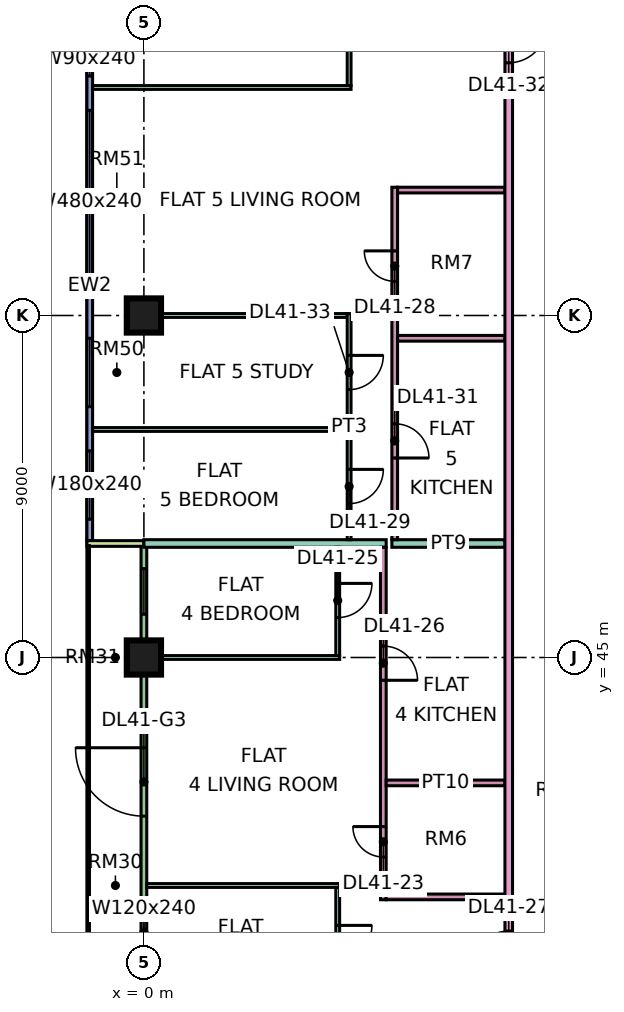
"""IFC4 building model, lengths in metres.
Left out: names, types, materials, properties, quantities, classifications, styles, units other than length and angle.
Written with IfcOpenShell. Run it as: python <this file> out.ifc"""

import sys

from ifc_helpers import new_model, si_unit, direction, frame, frame_2d, origin, origin_2d, place, context, subcontext, project, spatial, rectangle, extrude, element, fill, save


model = new_model("IFC4")
c1 = context("Model", 3, precision=1e-05, world=origin(), true_north=direction((0.0, 1.0)))
c2 = subcontext(c1, "Body", "Model", "MODEL_VIEW")
j1 = project(units=[si_unit("LENGTHUNIT", "METRE"), si_unit("PLANEANGLEUNIT", "RADIAN")], contexts=[c1])
p1 = place(None, origin())
s1 = spatial("IfcSite", under=j1, at=p1, CompositionType="ELEMENT")
p2 = place(p1, origin())
s2 = spatial("IfcBuilding", under=s1, at=p2, CompositionType="ELEMENT")
p3 = place(p2, frame((0.0, 0.0, 179.9)))
s3 = spatial("IfcBuildingStorey", under=s2, at=p3, CompositionType="ELEMENT", Elevation=179.9)
p4 = place(p3, frame((0.0, 45.0, 0.0), z_axis=(0.0, 0.0, 1.0), x_axis=(1.0, 0.0, 0.0)))
e1 = element("IfcColumn", 1, at=p4, inside=s3, PredefinedType="COLUMN", context=c2, shape_type="SweptSolid", body=[
    extrude(rectangle(XDim=0.9, YDim=0.9, at=origin_2d()), origin(), (0.0, 0.0, 1.0), 3.75),
])
p5 = place(p3, frame((0.0, 54.0, 0.0), z_axis=(0.0, 0.0, 1.0), x_axis=(1.0, 0.0, 0.0)))
e2 = element("IfcColumn", 2, at=p5, inside=s3, PredefinedType="COLUMN", context=c2, shape_type="SweptSolid", body=[
    extrude(rectangle(XDim=0.9, YDim=0.9, at=origin_2d()), origin(), (0.0, 0.0, 1.0), 3.75),
])
p6 = place(p3, frame((-1.425, 61.5, 0.0), z_axis=(0.0, 0.0, 1.0), x_axis=(0.0, -1.0, 0.0)))
e3 = element("IfcWall", 3, at=p6, inside=s3, PredefinedType="SOLIDWALL", context=c2, shape_type="SweptSolid", body=[
    extrude(rectangle(XDim=13.425, YDim=0.15, at=frame_2d((6.712, 0.0))), origin(), (0.0, 0.0, 1.0), 3.35),
])
p7 = place(p6, frame((0.3, 0.0, 0.45)))
e4 = element("IfcOpeningElement", 4, at=p7, cuts=e3, PredefinedType="OPENING", context=c2, shape_type="SweptSolid", body=[
    extrude(rectangle(XDim=0.9, YDim=2.4, at=frame_2d((0.45, 1.2))), frame((0.0, 0.085, 0.0), z_axis=(0.0, -1.0, 0.0), x_axis=(1.0, 0.0, 0.0)), (0.0, 0.0, 1.0), 0.17),
])
p8 = place(p6, frame((2.1, 0.0, 0.45)))
e5 = element("IfcOpeningElement", 5, at=p8, cuts=e3, PredefinedType="OPENING", context=c2, shape_type="SweptSolid", body=[
    extrude(rectangle(XDim=4.8, YDim=2.4, at=frame_2d((2.4, 1.2))), frame((0.0, 0.085, 0.0), z_axis=(0.0, -1.0, 0.0), x_axis=(1.0, 0.0, 0.0)), (0.0, 0.0, 1.0), 0.17),
])
p9 = place(p6, frame((8.1, 0.0, 0.45)))
e6 = element("IfcOpeningElement", 6, at=p9, cuts=e3, PredefinedType="OPENING", context=c2, shape_type="SweptSolid", body=[
    extrude(rectangle(XDim=1.8, YDim=2.4, at=frame_2d((0.9, 1.2))), frame((0.0, 0.085, 0.0), z_axis=(0.0, -1.0, 0.0), x_axis=(1.0, 0.0, 0.0)), (0.0, 0.0, 1.0), 0.17),
])
p10 = place(p6, frame((11.062, 0.0, 0.45)))
e7 = element("IfcOpeningElement", 7, at=p10, cuts=e3, PredefinedType="OPENING", context=c2, shape_type="SweptSolid", body=[
    extrude(rectangle(XDim=1.8, YDim=2.4, at=frame_2d((0.9, 1.2))), frame((0.0, 0.085, 0.0), z_axis=(0.0, -1.0, 0.0), x_axis=(1.0, 0.0, 0.0)), (0.0, 0.0, 1.0), 0.17),
])
p11 = place(p3, frame((0.0, 47.925, 0.0), z_axis=(0.0, 0.0, 1.0), x_axis=(0.0, -1.0, 0.0)))
e8 = element("IfcWall", 8, at=p11, inside=s3, PredefinedType="SOLIDWALL", context=c2, shape_type="SweptSolid", body=[
    extrude(rectangle(XDim=11.85, YDim=0.15, at=frame_2d((5.925, 0.0))), origin(), (0.0, 0.0, 1.0), 3.35),
])
p12 = place(p11, frame((0.587, 0.0, 0.45)))
e9 = element("IfcOpeningElement", 9, at=p12, cuts=e8, PredefinedType="OPENING", context=c2, shape_type="SweptSolid", body=[
    extrude(rectangle(XDim=1.2, YDim=2.4, at=frame_2d((0.6, 1.2))), frame((0.0, 0.085, 0.0), z_axis=(0.0, -1.0, 0.0), x_axis=(1.0, 0.0, 0.0)), (0.0, 0.0, 1.0), 0.17),
])
p13 = place(p11, frame((5.3, 0.0, 0.0)))
e10 = element("IfcOpeningElement", 10, at=p13, cuts=e8, PredefinedType="OPENING", context=c2, shape_type="SweptSolid", body=[
    extrude(rectangle(XDim=1.8, YDim=2.4, at=frame_2d((0.9, 1.2))), frame((0.0, 0.085, 0.0), z_axis=(0.0, -1.0, 0.0), x_axis=(1.0, 0.0, 0.0)), (0.0, 0.0, 1.0), 0.17),
])
p14 = place(p11, frame((9.55, 0.0, 0.45)))
e11 = element("IfcOpeningElement", 11, at=p14, cuts=e8, PredefinedType="OPENING", context=c2, shape_type="SweptSolid", body=[
    extrude(rectangle(XDim=1.2, YDim=2.4, at=frame_2d((0.6, 1.2))), frame((0.0, 0.085, 0.0), z_axis=(0.0, -1.0, 0.0), x_axis=(1.0, 0.0, 0.0)), (0.0, 0.0, 1.0), 0.17),
])
p15 = place(p3, frame((-1.5, 48.0, 0.0), z_axis=(0.0, 0.0, 1.0), x_axis=(1.0, 0.0, 0.0)))
e12 = element("IfcWall", 12, at=p15, inside=s3, PredefinedType="SOLIDWALL", context=c2, shape_type="SweptSolid", body=[
    extrude(rectangle(XDim=1.5, YDim=0.15, at=frame_2d((0.75, 0.0))), origin(), (0.0, 0.0, 1.0), 3.35),
])
p16 = place(p3, frame((0.0, 48.0, 0.0), z_axis=(0.0, 0.0, 1.0), x_axis=(1.0, 0.0, 0.0)))
e13 = element("IfcWall", 13, at=p16, inside=s3, PredefinedType="PARTITIONING", context=c2, shape_type="SweptSolid", body=[
    extrude(rectangle(XDim=6.375, YDim=0.2, at=frame_2d((3.188, 0.0))), origin(), (0.0, 0.0, 1.0), 3.35),
])
p17 = place(p3, frame((-1.35, 51.0, 0.0), z_axis=(0.0, 0.0, 1.0), x_axis=(1.0, 0.0, 0.0)))
e14 = element("IfcWall", 14, at=p17, inside=s3, PredefinedType="PARTITIONING", context=c2, shape_type="SweptSolid", body=[
    extrude(rectangle(XDim=6.7, YDim=0.1, at=frame_2d((3.35, 0.0))), origin(), (0.0, 0.0, 1.0), 3.35),
])
e15 = element("IfcWall", 15, at=p5, inside=s3, PredefinedType="PARTITIONING", context=c2, shape_type="SweptSolid", body=[
    extrude(rectangle(XDim=5.35, YDim=0.1, at=frame_2d((2.675, 0.0))), origin(), (0.0, 0.0, 1.0), 3.35),
])
p18 = place(p3, frame((-1.35, 60.0, 0.0), z_axis=(0.0, 0.0, 1.0), x_axis=(1.0, 0.0, 0.0)))
e16 = element("IfcWall", 16, at=p18, inside=s3, PredefinedType="PARTITIONING", context=c2, shape_type="SweptSolid", body=[
    extrude(rectangle(XDim=6.8, YDim=0.1, at=frame_2d((3.4, 0.0))), origin(), (0.0, 0.0, 1.0), 3.35),
])
for number, where, z_axis, x_axis in (
    (17, (0.074, 39.0, 0.0), (0.0, 0.0, 1.0), (1.0, 0.0, 0.0)),
    (18, (0.074, 45.0, 0.0), (0.0, 0.0, 1.0), (1.0, 0.0, 0.0)),
):
    element("IfcWall", number, at=place(p3, frame(where, z_axis=z_axis, x_axis=x_axis)), inside=s3, PredefinedType="PARTITIONING", context=c2, shape_type="SweptSolid", body=[
        extrude(rectangle(XDim=5.076, YDim=0.1, at=frame_2d((2.538, 0.0))), origin(), (0.0, 0.0, 1.0), 3.35),
    ])
p19 = place(p3, frame((5.1, 36.1, 0.0), z_axis=(0.0, 0.0, 1.0), x_axis=(0.0, 1.0, 0.0)))
e19 = element("IfcWall", 19, at=p19, inside=s3, PredefinedType="PARTITIONING", context=c2, shape_type="SweptSolid", body=[
    extrude(rectangle(XDim=2.85, YDim=0.1, at=frame_2d((1.425, 0.0))), origin(), (0.0, 0.0, 1.0), 3.35),
])
p20 = place(p19, frame((0.95, 0.0, 0.0)))
e20 = element("IfcOpeningElement", 20, at=p20, cuts=e19, PredefinedType="OPENING", context=c2, shape_type="SweptSolid", body=[
    extrude(rectangle(XDim=0.9, YDim=2.1, at=frame_2d((0.45, 1.05))), frame((0.0, 0.06, 0.0), z_axis=(0.0, -1.0, 0.0), x_axis=(1.0, 0.0, 0.0)), (0.0, 0.0, 1.0), 0.12),
])
p21 = place(p3, frame((5.1, 45.05, 0.0), z_axis=(0.0, 0.0, 1.0), x_axis=(0.0, 1.0, 0.0)))
e21 = element("IfcWall", 21, at=p21, inside=s3, PredefinedType="PARTITIONING", context=c2, shape_type="SweptSolid", body=[
    extrude(rectangle(XDim=2.85, YDim=0.1, at=frame_2d((1.425, 0.0))), origin(), (0.0, 0.0, 1.0), 3.35),
])
p22 = place(p21, frame((1.0, 0.0, 0.0)))
e22 = element("IfcOpeningElement", 22, at=p22, cuts=e21, PredefinedType="OPENING", context=c2, shape_type="SweptSolid", body=[
    extrude(rectangle(XDim=0.9, YDim=2.1, at=frame_2d((0.45, 1.05))), frame((0.0, 0.06, 0.0), z_axis=(0.0, -1.0, 0.0), x_axis=(1.0, 0.0, 0.0)), (0.0, 0.0, 1.0), 0.12),
])
p23 = place(p3, frame((5.4, 48.1, 0.0), z_axis=(0.0, 0.0, 1.0), x_axis=(0.0, 1.0, 0.0)))
e23 = element("IfcWall", 23, at=p23, inside=s3, PredefinedType="PARTITIONING", context=c2, shape_type="SweptSolid", body=[
    extrude(rectangle(XDim=5.95, YDim=0.1, at=frame_2d((2.975, 0.0))), origin(), (0.0, 0.0, 1.0), 3.35),
])
p24 = place(p23, frame((0.95, 0.0, 0.0)))
e24 = element("IfcOpeningElement", 24, at=p24, cuts=e23, PredefinedType="OPENING", context=c2, shape_type="SweptSolid", body=[
    extrude(rectangle(XDim=0.9, YDim=2.1, at=frame_2d((0.45, 1.05))), frame((0.0, 0.06, 0.0), z_axis=(0.0, -1.0, 0.0), x_axis=(1.0, 0.0, 0.0)), (0.0, 0.0, 1.0), 0.12),
])
p25 = place(p23, frame((3.95, 0.0, 0.0)))
e25 = element("IfcOpeningElement", 25, at=p25, cuts=e23, PredefinedType="OPENING", context=c2, shape_type="SweptSolid", body=[
    extrude(rectangle(XDim=0.9, YDim=2.1, at=frame_2d((0.45, 1.05))), frame((0.0, 0.06, 0.0), z_axis=(0.0, -1.0, 0.0), x_axis=(1.0, 0.0, 0.0)), (0.0, 0.0, 1.0), 0.12),
])
p26 = place(p3, frame((5.4, 60.05, 0.0), z_axis=(0.0, 0.0, 1.0), x_axis=(0.0, 1.0, 0.0)))
e26 = element("IfcWall", 26, at=p26, inside=s3, PredefinedType="PARTITIONING", context=c2, shape_type="SweptSolid", body=[
    extrude(rectangle(XDim=3.0, YDim=0.1, at=frame_2d((1.5, 0.0))), origin(), (0.0, 0.0, 1.0), 3.35),
])
p27 = place(p26, frame((1.0, 0.0, 0.0)))
e27 = element("IfcOpeningElement", 27, at=p27, cuts=e26, PredefinedType="OPENING", context=c2, shape_type="SweptSolid", body=[
    extrude(rectangle(XDim=0.9, YDim=2.1, at=frame_2d((0.45, 1.05))), frame((0.0, 0.06, 0.0), z_axis=(0.0, -1.0, 0.0), x_axis=(1.0, 0.0, 0.0)), (0.0, 0.0, 1.0), 0.12),
])
p28 = place(p3, frame((6.3, 38.625, 0.0), z_axis=(0.0, 0.0, 1.0), x_axis=(0.0, 1.0, 0.0)))
e28 = element("IfcWall", 28, at=p28, inside=s3, PredefinedType="PARTITIONING", context=c2, shape_type="SweptSolid", body=[
    extrude(rectangle(XDim=9.275, YDim=0.15, at=frame_2d((4.637, 0.0))), origin(), (0.0, 0.0, 1.0), 3.35),
])
p29 = place(p28, frame((1.125, 0.0, 0.0)))
e29 = element("IfcOpeningElement", 29, at=p29, cuts=e28, PredefinedType="OPENING", context=c2, shape_type="SweptSolid", body=[
    extrude(rectangle(XDim=0.8, YDim=2.1, at=frame_2d((0.4, 1.05))), frame((0.0, 0.085, 0.0), z_axis=(0.0, -1.0, 0.0), x_axis=(1.0, 0.0, 0.0)), (0.0, 0.0, 1.0), 0.17),
])
p30 = place(p28, frame((5.775, 0.0, 0.0)))
e30 = element("IfcOpeningElement", 30, at=p30, cuts=e28, PredefinedType="OPENING", context=c2, shape_type="SweptSolid", body=[
    extrude(rectangle(XDim=0.9, YDim=2.1, at=frame_2d((0.45, 1.05))), frame((0.0, 0.085, 0.0), z_axis=(0.0, -1.0, 0.0), x_axis=(1.0, 0.0, 0.0)), (0.0, 0.0, 1.0), 0.17),
])
for number, where, z_axis, x_axis in (
    (31, (6.375, 38.7, 0.0), (0.0, 0.0, 1.0), (1.0, 0.0, 0.0)),
    (32, (6.375, 41.7, 0.0), (0.0, 0.0, 1.0), (1.0, 0.0, 0.0)),
):
    element("IfcWall", number, at=place(p3, frame(where, z_axis=z_axis, x_axis=x_axis)), inside=s3, PredefinedType="PARTITIONING", context=c2, shape_type="SweptSolid", body=[
        extrude(rectangle(XDim=3.125, YDim=0.15, at=frame_2d((1.562, 0.0))), origin(), (0.0, 0.0, 1.0), 3.35),
    ])
p31 = place(p3, frame((6.525, 48.0, 0.0), z_axis=(0.0, 0.0, 1.0), x_axis=(1.0, 0.0, 0.0)))
e33 = element("IfcWall", 33, at=p31, inside=s3, PredefinedType="PARTITIONING", context=c2, shape_type="SweptSolid", body=[
    extrude(rectangle(XDim=2.975, YDim=0.2, at=frame_2d((1.488, 0.0))), origin(), (0.0, 0.0, 1.0), 3.35),
])
p32 = place(p3, frame((6.6, 48.1, 0.0), z_axis=(0.0, 0.0, 1.0), x_axis=(0.0, 1.0, 0.0)))
e34 = element("IfcWall", 34, at=p32, inside=s3, PredefinedType="PARTITIONING", context=c2, shape_type="SweptSolid", body=[
    extrude(rectangle(XDim=9.275, YDim=0.15, at=frame_2d((4.637, 0.0))), origin(), (0.0, 0.0, 1.0), 3.35),
])
p33 = place(p32, frame((6.8, 0.0, 0.0)))
e35 = element("IfcOpeningElement", 35, at=p33, cuts=e34, PredefinedType="OPENING", context=c2, shape_type="SweptSolid", body=[
    extrude(rectangle(XDim=0.8, YDim=2.1, at=frame_2d((0.4, 1.05))), frame((0.0, 0.085, 0.0), z_axis=(0.0, -1.0, 0.0), x_axis=(1.0, 0.0, 0.0)), (0.0, 0.0, 1.0), 0.17),
])
p34 = place(p32, frame((2.15, 0.0, 0.0)))
e36 = element("IfcOpeningElement", 36, at=p34, cuts=e34, PredefinedType="OPENING", context=c2, shape_type="SweptSolid", body=[
    extrude(rectangle(XDim=0.9, YDim=2.1, at=frame_2d((0.45, 1.05))), frame((0.0, 0.085, 0.0), z_axis=(0.0, -1.0, 0.0), x_axis=(1.0, 0.0, 0.0)), (0.0, 0.0, 1.0), 0.17),
])
for number, where, z_axis, x_axis in (
    (37, (6.675, 53.4, 0.0), (0.0, 0.0, 1.0), (1.0, 0.0, 0.0)),
    (38, (6.675, 57.3, 0.0), (0.0, 0.0, 1.0), (1.0, 0.0, 0.0)),
):
    element("IfcWall", number, at=place(p3, frame(where, z_axis=z_axis, x_axis=x_axis)), inside=s3, PredefinedType="PARTITIONING", context=c2, shape_type="SweptSolid", body=[
        extrude(rectangle(XDim=2.825, YDim=0.15, at=frame_2d((1.413, 0.0))), origin(), (0.0, 0.0, 1.0), 3.35),
    ])
p35 = place(p3, frame((9.6, 20.0, 0.0), z_axis=(0.0, 0.0, 1.0), x_axis=(0.0, 1.0, 0.0)))
e39 = element("IfcWall", 39, at=p35, inside=s3, PredefinedType="PARTITIONING", context=c2, shape_type="SweptSolid", body=[
    extrude(rectangle(XDim=44.35, YDim=0.2, at=frame_2d((22.175, 0.0))), origin(), (0.0, 0.0, 1.0), 3.35),
])
p36 = place(p35, frame((16.8, 0.0, 0.0)))
e40 = element("IfcOpeningElement", 40, at=p36, cuts=e39, PredefinedType="OPENING", context=c2, shape_type="SweptSolid", body=[
    extrude(rectangle(XDim=1.0, YDim=2.1, at=frame_2d((0.5, 1.05))), frame((0.0, 0.11, 0.0), z_axis=(0.0, -1.0, 0.0), x_axis=(1.0, 0.0, 0.0)), (0.0, 0.0, 1.0), 0.22),
])
p37 = place(p35, frame((40.65, 0.0, 0.0)))
e41 = element("IfcOpeningElement", 41, at=p37, cuts=e39, PredefinedType="OPENING", context=c2, shape_type="SweptSolid", body=[
    extrude(rectangle(XDim=1.0, YDim=2.1, at=frame_2d((0.5, 1.05))), frame((0.0, 0.11, 0.0), z_axis=(0.0, -1.0, 0.0), x_axis=(1.0, 0.0, 0.0)), (0.0, 0.0, 1.0), 0.22),
])
p38 = place(p35, frame((0.6, 0.0, 0.0)))
e42 = element("IfcOpeningElement", 42, at=p38, cuts=e39, PredefinedType="OPENING", context=c2, shape_type="SweptSolid", body=[
    extrude(rectangle(XDim=1.2, YDim=2.1, at=frame_2d((0.6, 1.05))), frame((0.0, 0.11, 0.0), z_axis=(0.0, -1.0, 0.0), x_axis=(1.0, 0.0, 0.0)), (0.0, 0.0, 1.0), 0.22),
])
p39 = place(p35, frame((4.2, 0.0, 0.0)))
e43 = element("IfcOpeningElement", 43, at=p39, cuts=e39, PredefinedType="OPENING", context=c2, shape_type="SweptSolid", body=[
    extrude(rectangle(XDim=1.0, YDim=2.1, at=frame_2d((0.5, 1.05))), frame((0.0, 0.11, 0.0), z_axis=(0.0, -1.0, 0.0), x_axis=(1.0, 0.0, 0.0)), (0.0, 0.0, 1.0), 0.22),
])
p40 = place(p7, origin())
e44 = element("IfcWindow", 44, at=p40, inside=s3, PartitioningType="SINGLE_PANEL", PredefinedType="WINDOW", context=c2, shape_type="SweptSolid", body=[
    extrude(rectangle(XDim=0.9, YDim=2.4, at=frame_2d((0.45, 1.2))), frame((0.0, 0.03, 0.0), z_axis=(0.0, -1.0, 0.0), x_axis=(1.0, 0.0, 0.0)), (0.0, 0.0, 1.0), 0.06),
])
fill(e4, e44)
p41 = place(p8, origin())
e45 = element("IfcWindow", 45, at=p41, inside=s3, PartitioningType="SINGLE_PANEL", PredefinedType="WINDOW", context=c2, shape_type="SweptSolid", body=[
    extrude(rectangle(XDim=4.8, YDim=2.4, at=frame_2d((2.4, 1.2))), frame((0.0, 0.03, 0.0), z_axis=(0.0, -1.0, 0.0), x_axis=(1.0, 0.0, 0.0)), (0.0, 0.0, 1.0), 0.06),
])
fill(e5, e45)
p42 = place(p9, origin())
e46 = element("IfcWindow", 46, at=p42, inside=s3, PartitioningType="SINGLE_PANEL", PredefinedType="WINDOW", context=c2, shape_type="SweptSolid", body=[
    extrude(rectangle(XDim=1.8, YDim=2.4, at=frame_2d((0.9, 1.2))), frame((0.0, 0.03, 0.0), z_axis=(0.0, -1.0, 0.0), x_axis=(1.0, 0.0, 0.0)), (0.0, 0.0, 1.0), 0.06),
])
fill(e6, e46)
p43 = place(p10, origin())
e47 = element("IfcWindow", 47, at=p43, inside=s3, PartitioningType="SINGLE_PANEL", PredefinedType="WINDOW", context=c2, shape_type="SweptSolid", body=[
    extrude(rectangle(XDim=1.8, YDim=2.4, at=frame_2d((0.9, 1.2))), frame((0.0, 0.03, 0.0), z_axis=(0.0, -1.0, 0.0), x_axis=(1.0, 0.0, 0.0)), (0.0, 0.0, 1.0), 0.06),
])
fill(e7, e47)
p44 = place(p12, origin())
e48 = element("IfcWindow", 48, at=p44, inside=s3, PartitioningType="SINGLE_PANEL", PredefinedType="WINDOW", context=c2, shape_type="SweptSolid", body=[
    extrude(rectangle(XDim=1.2, YDim=2.4, at=frame_2d((0.6, 1.2))), frame((0.0, 0.03, 0.0), z_axis=(0.0, -1.0, 0.0), x_axis=(1.0, 0.0, 0.0)), (0.0, 0.0, 1.0), 0.06),
])
fill(e9, e48)
p45 = place(p13, frame((1.8, 0.0, 0.0), z_axis=(0.0, 0.0, 1.0), x_axis=(-1.0, 0.0, 0.0)))
e49 = element("IfcDoor", 49, at=p45, inside=s3, OperationType="DOUBLE_DOOR_SINGLE_SWING", PredefinedType="DOOR", context=c2, shape_type="SweptSolid", body=[
    extrude(rectangle(XDim=1.8, YDim=2.4, at=frame_2d((0.9, 1.2))), frame((0.0, 0.025, 0.0), z_axis=(0.0, -1.0, 0.0), x_axis=(1.0, 0.0, 0.0)), (0.0, 0.0, 1.0), 0.05),
])
fill(e10, e49)
p46 = place(p14, origin())
e50 = element("IfcWindow", 50, at=p46, inside=s3, PartitioningType="SINGLE_PANEL", PredefinedType="WINDOW", context=c2, shape_type="SweptSolid", body=[
    extrude(rectangle(XDim=1.2, YDim=2.4, at=frame_2d((0.6, 1.2))), frame((0.0, 0.03, 0.0), z_axis=(0.0, -1.0, 0.0), x_axis=(1.0, 0.0, 0.0)), (0.0, 0.0, 1.0), 0.06),
])
fill(e11, e50)
p47 = place(p29, frame((0.8, 0.0, 0.0), z_axis=(0.0, 0.0, 1.0), x_axis=(-1.0, 0.0, 0.0)))
e51 = element("IfcDoor", 51, at=p47, inside=s3, OperationType="SINGLE_SWING_RIGHT", PredefinedType="DOOR", context=c2, shape_type="SweptSolid", body=[
    extrude(rectangle(XDim=0.8, YDim=2.1, at=frame_2d((0.4, 1.05))), frame((0.0, 0.025, 0.0), z_axis=(0.0, -1.0, 0.0), x_axis=(1.0, 0.0, 0.0)), (0.0, 0.0, 1.0), 0.05),
])
fill(e29, e51)
p48 = place(p20, origin())
e52 = element("IfcDoor", 52, at=p48, inside=s3, OperationType="SINGLE_SWING_RIGHT", PredefinedType="DOOR", context=c2, shape_type="SweptSolid", body=[
    extrude(rectangle(XDim=0.9, YDim=2.1, at=frame_2d((0.45, 1.05))), frame((0.0, 0.025, 0.0), z_axis=(0.0, -1.0, 0.0), x_axis=(1.0, 0.0, 0.0)), (0.0, 0.0, 1.0), 0.05),
])
fill(e20, e52)
p49 = place(p22, origin())
e53 = element("IfcDoor", 53, at=p49, inside=s3, OperationType="SINGLE_SWING_RIGHT", PredefinedType="DOOR", context=c2, shape_type="SweptSolid", body=[
    extrude(rectangle(XDim=0.9, YDim=2.1, at=frame_2d((0.45, 1.05))), frame((0.0, 0.025, 0.0), z_axis=(0.0, -1.0, 0.0), x_axis=(1.0, 0.0, 0.0)), (0.0, 0.0, 1.0), 0.05),
])
fill(e22, e53)
p50 = place(p30, frame((0.9, 0.0, 0.0), z_axis=(0.0, 0.0, 1.0), x_axis=(-1.0, 0.0, 0.0)))
e54 = element("IfcDoor", 54, at=p50, inside=s3, OperationType="SINGLE_SWING_LEFT", PredefinedType="DOOR", context=c2, shape_type="SweptSolid", body=[
    extrude(rectangle(XDim=0.9, YDim=2.1, at=frame_2d((0.45, 1.05))), frame((0.0, 0.025, 0.0), z_axis=(0.0, -1.0, 0.0), x_axis=(1.0, 0.0, 0.0)), (0.0, 0.0, 1.0), 0.05),
])
fill(e30, e54)
p51 = place(p36, origin())
e55 = element("IfcDoor", 55, at=p51, inside=s3, OperationType="SINGLE_SWING_LEFT", PredefinedType="DOOR", context=c2, shape_type="SweptSolid", body=[
    extrude(rectangle(XDim=1.0, YDim=2.1, at=frame_2d((0.5, 1.05))), frame((0.0, 0.025, 0.0), z_axis=(0.0, -1.0, 0.0), x_axis=(1.0, 0.0, 0.0)), (0.0, 0.0, 1.0), 0.05),
])
fill(e40, e55)
p52 = place(p33, frame((0.8, 0.0, 0.0), z_axis=(0.0, 0.0, 1.0), x_axis=(-1.0, 0.0, 0.0)))
e56 = element("IfcDoor", 56, at=p52, inside=s3, OperationType="SINGLE_SWING_RIGHT", PredefinedType="DOOR", context=c2, shape_type="SweptSolid", body=[
    extrude(rectangle(XDim=0.8, YDim=2.1, at=frame_2d((0.4, 1.05))), frame((0.0, 0.025, 0.0), z_axis=(0.0, -1.0, 0.0), x_axis=(1.0, 0.0, 0.0)), (0.0, 0.0, 1.0), 0.05),
])
fill(e35, e56)
p53 = place(p24, origin())
e57 = element("IfcDoor", 57, at=p53, inside=s3, OperationType="SINGLE_SWING_RIGHT", PredefinedType="DOOR", context=c2, shape_type="SweptSolid", body=[
    extrude(rectangle(XDim=0.9, YDim=2.1, at=frame_2d((0.45, 1.05))), frame((0.0, 0.025, 0.0), z_axis=(0.0, -1.0, 0.0), x_axis=(1.0, 0.0, 0.0)), (0.0, 0.0, 1.0), 0.05),
])
fill(e24, e57)
p54 = place(p34, frame((0.9, 0.0, 0.0), z_axis=(0.0, 0.0, 1.0), x_axis=(-1.0, 0.0, 0.0)))
e58 = element("IfcDoor", 58, at=p54, inside=s3, OperationType="SINGLE_SWING_LEFT", PredefinedType="DOOR", context=c2, shape_type="SweptSolid", body=[
    extrude(rectangle(XDim=0.9, YDim=2.1, at=frame_2d((0.45, 1.05))), frame((0.0, 0.025, 0.0), z_axis=(0.0, -1.0, 0.0), x_axis=(1.0, 0.0, 0.0)), (0.0, 0.0, 1.0), 0.05),
])
fill(e36, e58)
p55 = place(p37, origin())
e59 = element("IfcDoor", 59, at=p55, inside=s3, OperationType="SINGLE_SWING_RIGHT", PredefinedType="DOOR", context=c2, shape_type="SweptSolid", body=[
    extrude(rectangle(XDim=1.0, YDim=2.1, at=frame_2d((0.5, 1.05))), frame((0.0, 0.025, 0.0), z_axis=(0.0, -1.0, 0.0), x_axis=(1.0, 0.0, 0.0)), (0.0, 0.0, 1.0), 0.05),
])
fill(e41, e59)
p56 = place(p25, origin())
e60 = element("IfcDoor", 60, at=p56, inside=s3, OperationType="SINGLE_SWING_RIGHT", PredefinedType="DOOR", context=c2, shape_type="SweptSolid", body=[
    extrude(rectangle(XDim=0.9, YDim=2.1, at=frame_2d((0.45, 1.05))), frame((0.0, 0.025, 0.0), z_axis=(0.0, -1.0, 0.0), x_axis=(1.0, 0.0, 0.0)), (0.0, 0.0, 1.0), 0.05),
])
fill(e25, e60)
save(model, sys.argv[1])
